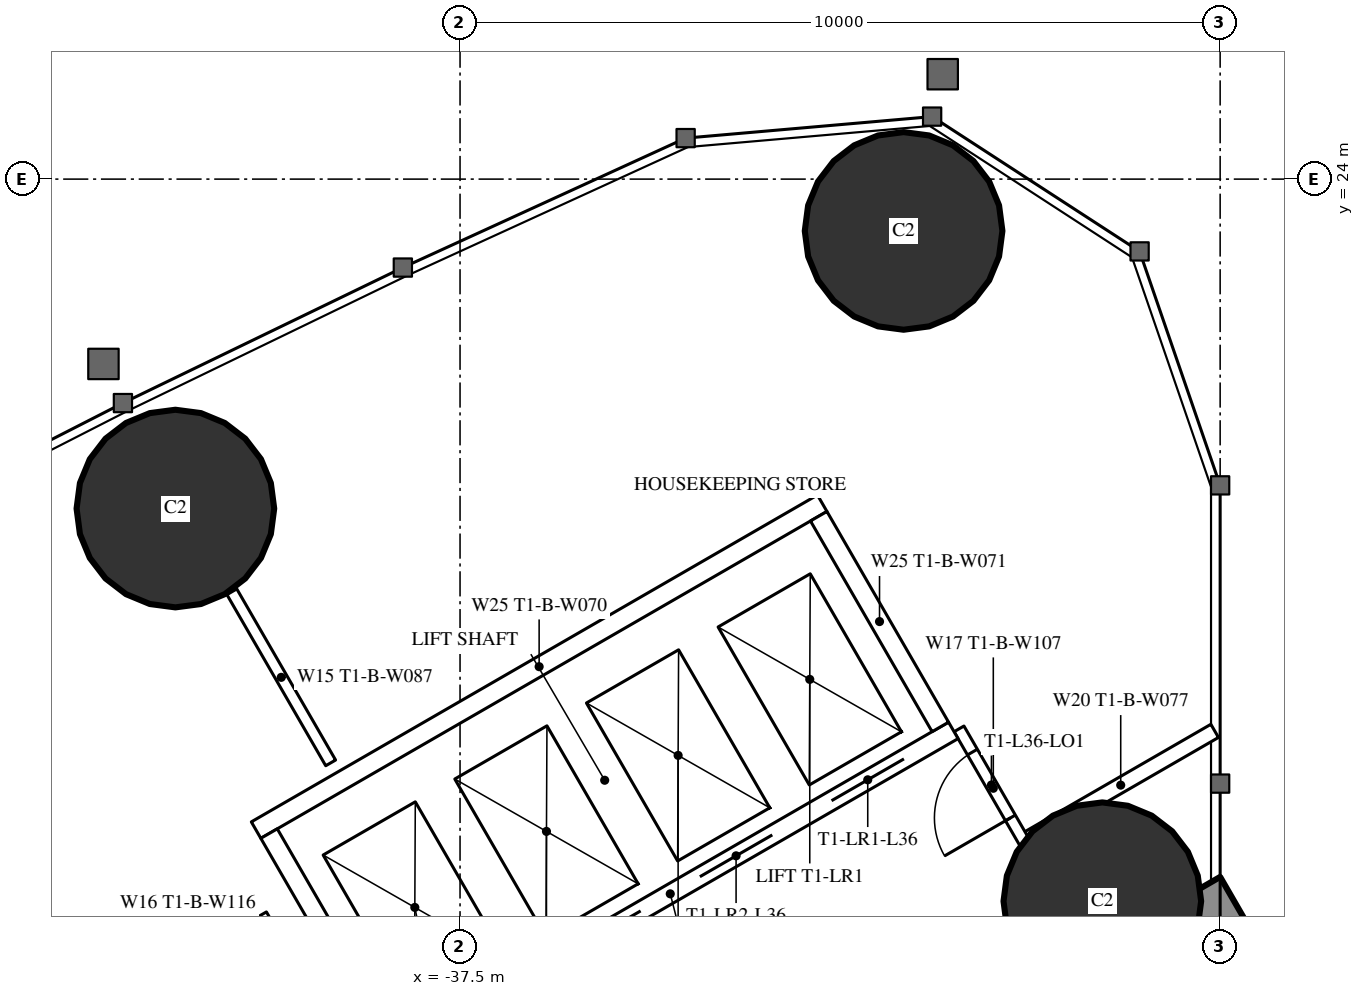
"""IFC4 building model, lengths in metres.
Left out: names, types, materials, properties, quantities, classifications, styles, units other than length and angle.
Written with IfcOpenShell. Run it as: python <this file> out.ifc"""

import sys

from ifc_helpers import new_model, si_unit, direction, frame, frame_2d, origin, origin_2d, place, context, subcontext, project, spatial, rectangle, hollow_circle, extrude, element, fill, save


model = new_model("IFC4")
c1 = context("Model", 3, precision=1e-05, world=origin(), true_north=direction((0.0, 1.0)))
c2 = subcontext(c1, "Body", "Model", "MODEL_VIEW")
j1 = project(units=[si_unit("LENGTHUNIT", "METRE"), si_unit("PLANEANGLEUNIT", "RADIAN")], contexts=[c1])
p1 = place(None, origin())
s1 = spatial("IfcSite", under=j1, at=p1, CompositionType="ELEMENT")
p2 = place(p1, origin())
s2 = spatial("IfcBuilding", under=s1, at=p2, CompositionType="ELEMENT")
p3 = place(p2, frame((0.0, 0.0, 136.1)))
s3 = spatial("IfcBuildingStorey", under=s2, at=p3, CompositionType="ELEMENT", Elevation=136.1)
for number, where, z_axis, x_axis in (
    (1, (-31.665, 23.318, 0.0), (0.0, 0.0, 1.0), (1.0, 0.0, 0.0)),
    (2, (-29.05, 14.5, 0.0), (0.0, 0.0, 1.0), (1.0, 0.0, 0.0)),
    (3, (-41.245, 19.666, 0.0), (0.0, 0.0, 1.0), (1.0, 0.0, 0.0)),
):
    element("IfcColumn", number, at=place(p3, frame(where, z_axis=z_axis, x_axis=x_axis)), inside=s3, PredefinedType="COLUMN", context=c2, shape_type="SweptSolid", body=[
        extrude(hollow_circle(Radius=1.3, WallThickness=0.1, at=origin_2d()), origin(), (0.0, 0.0, 1.0), 3.5),
    ])
p4 = place(p3, frame((-27.2, 14.3, 0.0), z_axis=(0.0, 0.0, 1.0), x_axis=(-0.866026593062, -0.499997940104, 0.0)))
e4 = element("IfcWall", 4, at=p4, inside=s3, PredefinedType="SHEAR", context=c2, shape_type="SweptSolid", body=[
    extrude(rectangle(XDim=28.946, YDim=1.2, at=frame_2d((14.473, 0.0))), origin(), (0.0, 0.0, 1.0), 3.5),
])
p5 = place(p4, frame((4.6, 0.0, 0.0)))
e5 = element("IfcOpeningElement", 5, at=p5, cuts=e4, PredefinedType="OPENING", context=c2, shape_type="SweptSolid", body=[
    extrude(rectangle(XDim=1.0, YDim=2.2, at=frame_2d((0.5, 1.1))), frame((0.0, 0.61, 0.0), z_axis=(0.0, -1.0, 0.0), x_axis=(1.0, 0.0, 0.0)), (0.0, 0.0, 1.0), 1.22),
])
p6 = place(p4, frame((13.395, 0.0, 0.0)))
e6 = element("IfcOpeningElement", 6, at=p6, cuts=e4, PredefinedType="OPENING", context=c2, shape_type="SweptSolid", body=[
    extrude(rectangle(XDim=1.8, YDim=2.2, at=frame_2d((0.9, 1.1))), frame((0.0, 0.61, 0.0), z_axis=(0.0, -1.0, 0.0), x_axis=(1.0, 0.0, 0.0)), (0.0, 0.0, 1.0), 1.22),
])
p7 = place(p3, frame((-39.202, 16.32, 0.0), z_axis=(0.0, 0.0, 1.0), x_axis=(-0.499947391036, 0.866055775454, 0.0)))
e7 = element("IfcWall", 7, at=p7, inside=s3, PredefinedType="PARTITIONING", context=c2, shape_type="SweptSolid", body=[
    extrude(rectangle(XDim=2.599, YDim=0.15, at=frame_2d((1.3, 0.0))), origin(), (0.0, 0.0, 1.0), 3.25),
])
p8 = place(p3, frame((-27.572, 16.741, 0.0), z_axis=(0.0, 0.0, 1.0), x_axis=(-0.866034618596, -0.499984039138, 0.0)))
e8 = element("IfcWall", 8, at=p8, inside=s3, PredefinedType="PARTITIONING", context=c2, shape_type="SweptSolid", body=[
    extrude(rectangle(XDim=2.854, YDim=0.2, at=frame_2d((1.427, 0.0))), origin(), (0.0, 0.0, 1.0), 3.25),
])
p9 = place(p3, frame((-30.033, 15.205, 0.0), z_axis=(0.0, 0.0, 1.0), x_axis=(-0.499980071345, 0.866036909293, 0.0)))
e9 = element("IfcWall", 9, at=p9, inside=s3, PredefinedType="PARTITIONING", context=c2, shape_type="SweptSolid", body=[
    extrude(rectangle(XDim=1.805, YDim=0.15, at=frame_2d((0.902, 0.0))), origin(), (0.0, 0.0, 1.0), 2.2),
])
p10 = place(p9, frame((0.452, 0.0, 0.0)))
e10 = element("IfcOpeningElement", 10, at=p10, cuts=e9, PredefinedType="OPENING", context=c2, shape_type="SweptSolid", body=[
    extrude(rectangle(XDim=1.0, YDim=2.2, at=frame_2d((0.5, 1.1))), frame((0.0, 0.085, 0.0), z_axis=(0.0, -1.0, 0.0), x_axis=(1.0, 0.0, 0.0)), (0.0, 0.0, 1.0), 0.17),
])
p11 = place(p3, frame((-40.01, 14.294, 0.0), z_axis=(0.0, 0.0, 1.0), x_axis=(-0.866031185235, -0.4999899861, 0.0)))
e11 = element("IfcWall", 11, at=p11, inside=s3, PredefinedType="PARTITIONING", context=c2, shape_type="SweptSolid", body=[
    extrude(rectangle(XDim=2.475, YDim=0.15, at=frame_2d((1.238, 0.0))), origin(), (0.0, 0.0, 1.0), 3.25),
])
p12 = place(p3, frame((-31.01, 16.747, 0.0), z_axis=(0.0, 0.0, 1.0), x_axis=(-0.866028165386, -0.499995216735, 0.0)))
e12 = element("IfcWall", 12, at=p12, inside=s3, PredefinedType="PARTITIONING", context=c2, shape_type="SweptSolid", body=[
    extrude(rectangle(XDim=8.6, YDim=0.25, at=frame_2d((4.3, 0.0))), origin(), (0.0, 0.0, 1.0), 3.25),
])
p13 = place(p12, frame((0.75, 0.0, 0.0)))
e13 = element("IfcOpeningElement", 13, at=p13, cuts=e12, PredefinedType="OPENING", context=c2, shape_type="SweptSolid", body=[
    extrude(rectangle(XDim=1.1, YDim=2.2, at=frame_2d((0.55, 1.1))), frame((0.0, 0.135, 0.0), z_axis=(0.0, -1.0, 0.0), x_axis=(1.0, 0.0, 0.0)), (0.0, 0.0, 1.0), 0.27),
])
p14 = place(p12, frame((2.75, 0.0, 0.0)))
e14 = element("IfcOpeningElement", 14, at=p14, cuts=e12, PredefinedType="OPENING", context=c2, shape_type="SweptSolid", body=[
    extrude(rectangle(XDim=1.1, YDim=2.2, at=frame_2d((0.55, 1.1))), frame((0.0, 0.135, 0.0), z_axis=(0.0, -1.0, 0.0), x_axis=(1.0, 0.0, 0.0)), (0.0, 0.0, 1.0), 0.27),
])
p15 = place(p12, frame((4.75, 0.0, 0.0)))
e15 = element("IfcOpeningElement", 15, at=p15, cuts=e12, PredefinedType="OPENING", context=c2, shape_type="SweptSolid", body=[
    extrude(rectangle(XDim=1.1, YDim=2.2, at=frame_2d((0.55, 1.1))), frame((0.0, 0.135, 0.0), z_axis=(0.0, -1.0, 0.0), x_axis=(1.0, 0.0, 0.0)), (0.0, 0.0, 1.0), 0.27),
])
p16 = place(p12, frame((6.75, 0.0, 0.0)))
e16 = element("IfcOpeningElement", 16, at=p16, cuts=e12, PredefinedType="OPENING", context=c2, shape_type="SweptSolid", body=[
    extrude(rectangle(XDim=1.1, YDim=2.2, at=frame_2d((0.55, 1.1))), frame((0.0, 0.135, 0.0), z_axis=(0.0, -1.0, 0.0), x_axis=(1.0, 0.0, 0.0)), (0.0, 0.0, 1.0), 0.27),
])
p17 = place(p3, frame((-32.736, 19.736, 0.0), z_axis=(0.0, 0.0, 1.0), x_axis=(-0.866028165386, -0.499995216735, 0.0)))
e17 = element("IfcWall", 17, at=p17, inside=s3, PredefinedType="PARTITIONING", context=c2, shape_type="SweptSolid", body=[
    extrude(rectangle(XDim=8.6, YDim=0.25, at=frame_2d((4.3, 0.0))), origin(), (0.0, 0.0, 1.0), 3.25),
])
p18 = place(p3, frame((-31.181, 16.793, 0.0), z_axis=(0.0, 0.0, 1.0), x_axis=(-0.499929347863, 0.866066190972, 0.0)))
e18 = element("IfcWall", 18, at=p18, inside=s3, PredefinedType="PARTITIONING", context=c2, shape_type="SweptSolid", body=[
    extrude(rectangle(XDim=3.201, YDim=0.25, at=frame_2d((1.6, 0.0))), origin(), (0.0, 0.0, 1.0), 3.25),
])
p19 = place(p3, frame((-38.413, 12.618, 0.0), z_axis=(0.0, 0.0, 1.0), x_axis=(-0.499872130319, 0.866099216793, 0.0)))
e19 = element("IfcWall", 19, at=p19, inside=s3, PredefinedType="PARTITIONING", context=c2, shape_type="SweptSolid", body=[
    extrude(rectangle(XDim=3.2, YDim=0.25, at=frame_2d((1.6, 0.0))), origin(), (0.0, 0.0, 1.0), 3.25),
])
p20 = place(p10, origin())
e20 = element("IfcDoor", 20, at=p20, inside=s3, OperationType="SINGLE_SWING_LEFT", PredefinedType="DOOR", context=c2, shape_type="SweptSolid", body=[
    extrude(rectangle(XDim=1.0, YDim=2.2, at=frame_2d((0.5, 1.1))), frame((0.0, 0.025, 0.0), z_axis=(0.0, -1.0, 0.0), x_axis=(1.0, 0.0, 0.0)), (0.0, 0.0, 1.0), 0.05),
])
fill(e10, e20)
p21 = place(p13, origin())
e21 = element("IfcDoor", 21, at=p21, inside=s3, OperationType="DOUBLE_DOOR_SLIDING", PredefinedType="USERDEFINED", context=c2, shape_type="SweptSolid", body=[
    extrude(rectangle(XDim=1.1, YDim=2.2, at=frame_2d((0.55, 1.1))), frame((0.0, 0.025, 0.0), z_axis=(0.0, -1.0, 0.0), x_axis=(1.0, 0.0, 0.0)), (0.0, 0.0, 1.0), 0.05),
])
fill(e13, e21)
p22 = place(p14, origin())
e22 = element("IfcDoor", 22, at=p22, inside=s3, OperationType="DOUBLE_DOOR_SLIDING", PredefinedType="USERDEFINED", context=c2, shape_type="SweptSolid", body=[
    extrude(rectangle(XDim=1.1, YDim=2.2, at=frame_2d((0.55, 1.1))), frame((0.0, 0.025, 0.0), z_axis=(0.0, -1.0, 0.0), x_axis=(1.0, 0.0, 0.0)), (0.0, 0.0, 1.0), 0.05),
])
fill(e14, e22)
p23 = place(p15, origin())
e23 = element("IfcDoor", 23, at=p23, inside=s3, OperationType="DOUBLE_DOOR_SLIDING", PredefinedType="USERDEFINED", context=c2, shape_type="SweptSolid", body=[
    extrude(rectangle(XDim=1.1, YDim=2.2, at=frame_2d((0.55, 1.1))), frame((0.0, 0.025, 0.0), z_axis=(0.0, -1.0, 0.0), x_axis=(1.0, 0.0, 0.0)), (0.0, 0.0, 1.0), 0.05),
])
fill(e15, e23)
save(model, sys.argv[1])
